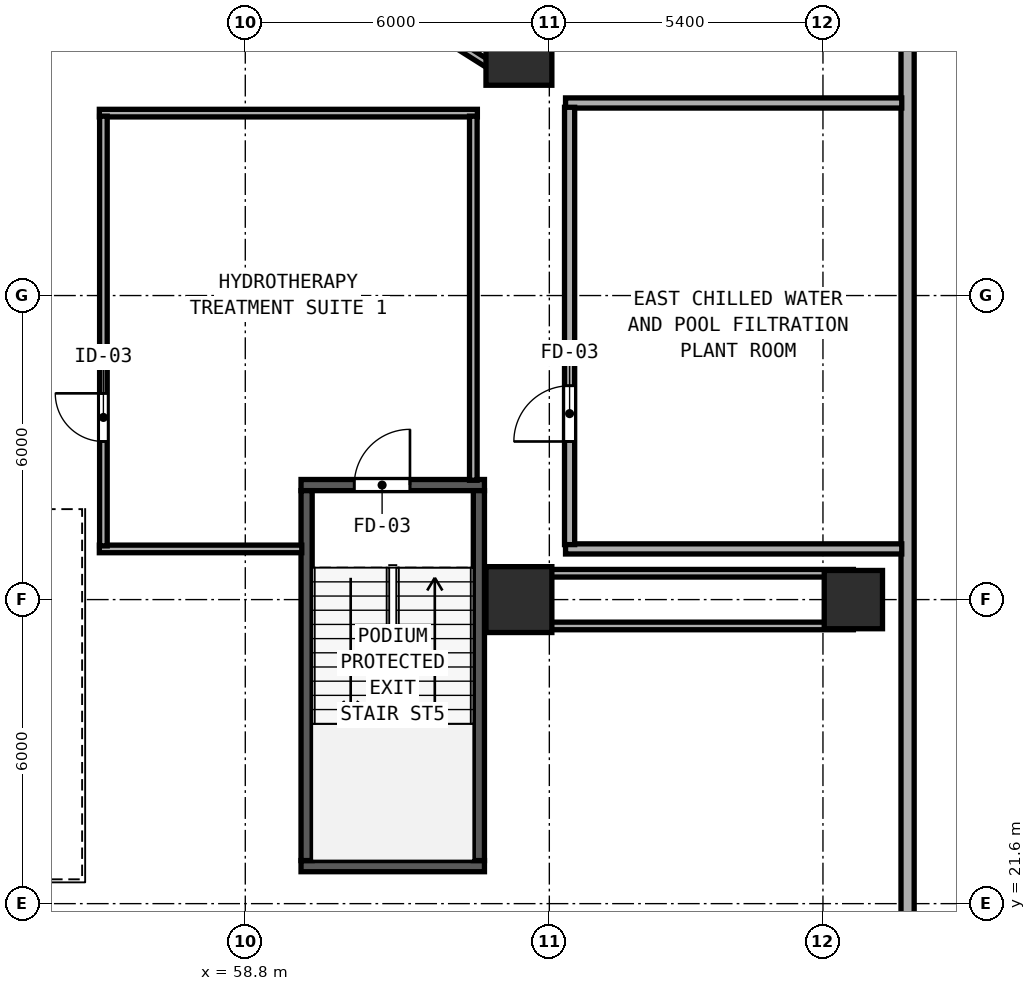
"""IFC4 building model, lengths in metres.
Left out: names, types, materials, properties, quantities, classifications, styles, units other than length and angle.
Written with IfcOpenShell. Run it as: python <this file> out.ifc"""

import sys

from ifc_helpers import new_model, si_unit, direction, frame, frame_2d, origin, origin_2d, place, context, subcontext, project, spatial, rectangle, hollow_rectangle, extrude, element, fill, save


model = new_model("IFC4")
c1 = context("Model", 3, precision=1e-05, world=origin(), true_north=direction((0.0, 1.0)))
c2 = subcontext(c1, "Body", "Model", "MODEL_VIEW")
j1 = project(units=[si_unit("LENGTHUNIT", "METRE"), si_unit("PLANEANGLEUNIT", "RADIAN")], contexts=[c1])
p1 = place(None, origin())
s1 = spatial("IfcSite", under=j1, at=p1, CompositionType="ELEMENT")
p2 = place(p1, origin())
s2 = spatial("IfcBuilding", under=s1, at=p2, CompositionType="ELEMENT")
p3 = place(p2, frame((0.0, 0.0, 19.8)))
s3 = spatial("IfcBuildingStorey", under=s2, at=p3, CompositionType="ELEMENT", Elevation=19.8)
p4 = place(p3, frame((59.9, 29.86, 0.0), z_axis=(0.0, 0.0, 1.0), x_axis=(1.0, 0.0, 0.0)))
e1 = element("IfcWall", 1, at=p4, inside=s3, PredefinedType="SHEAR", context=c2, shape_type="SweptSolid", body=[
    extrude(rectangle(XDim=3.62, YDim=0.22, at=frame_2d((1.81, 0.0))), origin(), (0.0, 0.0, 1.0), 4.0),
])
p5 = place(p4, frame((1.05, 0.0, 0.0)))
e2 = element("IfcOpeningElement", 2, at=p5, cuts=e1, PredefinedType="OPENING", context=c2, shape_type="SweptSolid", body=[
    extrude(rectangle(XDim=1.1, YDim=2.15, at=frame_2d((0.55, 1.075))), frame((0.0, 0.12, 0.0), z_axis=(0.0, -1.0, 0.0), x_axis=(1.0, 0.0, 0.0)), (0.0, 0.0, 1.0), 0.24),
])
p6 = place(p3, frame((59.9, 22.34, 0.0), z_axis=(0.0, 0.0, 1.0), x_axis=(1.0, 0.0, 0.0)))
e3 = element("IfcWall", 3, at=p6, inside=s3, PredefinedType="SHEAR", context=c2, shape_type="SweptSolid", body=[
    extrude(rectangle(XDim=3.62, YDim=0.22, at=frame_2d((1.81, 0.0))), origin(), (0.0, 0.0, 1.0), 4.0),
])
for number, where, z_axis, x_axis in (
    (4, (60.01, 22.45, 0.0), (0.0, 0.0, 1.0), (0.0, 1.0, 0.0)),
    (5, (63.41, 22.45, 0.0), (0.0, 0.0, 1.0), (0.0, 1.0, 0.0)),
):
    element("IfcWall", number, at=place(p3, frame(where, z_axis=z_axis, x_axis=x_axis)), inside=s3, PredefinedType="SHEAR", context=c2, shape_type="SweptSolid", body=[
        extrude(rectangle(XDim=7.3, YDim=0.22, at=frame_2d((3.65, 0.0))), origin(), (0.0, 0.0, 1.0), 4.0),
    ])
for number, where, z_axis, x_axis in (
    (6, (64.2, 27.6, 0.0), (0.0, 0.0, 1.0), (1.0, 0.0, 0.0)),
    (7, (64.2, 38.4, 0.0), (0.0, 0.0, 1.0), (1.0, 0.0, 0.0)),
):
    element("IfcColumn", number, at=place(p3, frame(where, z_axis=z_axis, x_axis=x_axis)), inside=s3, PredefinedType="COLUMN", context=c2, shape_type="SweptSolid", body=[
        extrude(hollow_rectangle(XDim=1.3, YDim=1.3, WallThickness=0.048, at=origin_2d()), origin(), (0.0, 0.0, 1.0), 4.2),
    ])
p7 = place(p3, frame((70.8, 27.6, 0.0), z_axis=(0.0, 0.0, 1.0), x_axis=(1.0, 0.0, 0.0)))
e8 = element("IfcColumn", 8, at=p7, inside=s3, PredefinedType="COLUMN", context=c2, shape_type="SweptSolid", body=[
    extrude(hollow_rectangle(XDim=1.15, YDim=1.15, WallThickness=0.042, at=origin_2d()), origin(), (0.0, 0.0, 1.0), 4.2),
])
p8 = place(p3, frame((71.87, 16.799, 0.0), z_axis=(0.0, 0.0, 1.0), x_axis=(0.0, 1.0, 0.0)))
e9 = element("IfcWall", 9, at=p8, inside=s3, PredefinedType="SOLIDWALL", context=c2, shape_type="SweptSolid", body=[
    extrude(rectangle(XDim=37.296, YDim=0.26, at=frame_2d((18.648, 0.0))), origin(), (0.0, 0.0, 1.0), 4.0),
])
p9 = place(p3, frame((53.38, 21.92, 0.0), z_axis=(0.0, 0.0, 1.0), x_axis=(0.921634222314, -0.388059738005, 0.0)))
e10 = element("IfcWall", 10, at=p9, inside=s3, PredefinedType="PARTITIONING", context=c2, shape_type="SweptSolid", body=[
    extrude(rectangle(XDim=11.959, YDim=0.15, at=frame_2d((5.979, 0.0))), origin(), (0.0, 0.0, 1.0), 4.0),
])
p10 = place(p3, frame((53.38, 44.619, 0.0), z_axis=(0.0, 0.0, 1.0), x_axis=(0.845487507253, -0.533995201364, 0.0)))
e11 = element("IfcWall", 11, at=p10, inside=s3, PredefinedType="PARTITIONING", context=c2, shape_type="SweptSolid", body=[
    extrude(rectangle(XDim=12.469, YDim=0.15, at=frame_2d((6.234, 0.0))), origin(), (0.0, 0.0, 1.0), 4.0),
])
for number, where, z_axis, x_axis in (
    (12, (64.2, 27.08, 0.0), (0.0, 0.0, 1.0), (1.0, 0.0, 0.0)),
    (13, (64.2, 28.12, 0.0), (0.0, 0.0, 1.0), (1.0, 0.0, 0.0)),
):
    element("IfcWall", number, at=place(p3, frame(where, z_axis=z_axis, x_axis=x_axis)), inside=s3, PredefinedType="PARTITIONING", context=c2, shape_type="SweptSolid", body=[
        extrude(rectangle(XDim=6.6, YDim=0.15, at=frame_2d((3.3, 0.0))), origin(), (0.0, 0.0, 1.0), 4.0),
    ])
p11 = place(p3, frame((55.92, 37.2, 0.0), z_axis=(0.0, 0.0, 1.0), x_axis=(1.0, 0.0, 0.0)))
e14 = element("IfcWall", 14, at=p11, inside=s3, PredefinedType="PARTITIONING", context=c2, shape_type="SweptSolid", body=[
    extrude(rectangle(XDim=7.46, YDim=0.15, at=frame_2d((3.73, 0.0))), origin(), (0.0, 0.0, 1.0), 4.0),
])
p12 = place(p3, frame((55.92, 28.6, 0.0), z_axis=(0.0, 0.0, 1.0), x_axis=(1.0, 0.0, 0.0)))
e15 = element("IfcWall", 15, at=p12, inside=s3, PredefinedType="PARTITIONING", context=c2, shape_type="SweptSolid", body=[
    extrude(rectangle(XDim=3.995, YDim=0.15, at=frame_2d((1.998, 0.0))), origin(), (0.0, 0.0, 1.0), 4.0),
])
p13 = place(p3, frame((56.0, 28.66, 0.0), z_axis=(0.0, 0.0, 1.0), x_axis=(0.0, 1.0, 0.0)))
e16 = element("IfcWall", 16, at=p13, inside=s3, PredefinedType="PARTITIONING", context=c2, shape_type="SweptSolid", body=[
    extrude(rectangle(XDim=8.48, YDim=0.15, at=frame_2d((4.24, 0.0))), origin(), (0.0, 0.0, 1.0), 4.0),
])
p14 = place(p13, frame((2.06, 0.0, 0.0)))
e17 = element("IfcOpeningElement", 17, at=p14, cuts=e16, PredefinedType="OPENING", context=c2, shape_type="SweptSolid", body=[
    extrude(rectangle(XDim=0.95, YDim=2.12, at=frame_2d((0.475, 1.06))), frame((0.0, 0.085, 0.0), z_axis=(0.0, -1.0, 0.0), x_axis=(1.0, 0.0, 0.0)), (0.0, 0.0, 1.0), 0.17),
])
p15 = place(p3, frame((63.3, 29.955, 0.0), z_axis=(0.0, 0.0, 1.0), x_axis=(0.0, 1.0, 0.0)))
e18 = element("IfcWall", 18, at=p15, inside=s3, PredefinedType="PARTITIONING", context=c2, shape_type="SweptSolid", body=[
    extrude(rectangle(XDim=7.185, YDim=0.15, at=frame_2d((3.592, 0.0))), origin(), (0.0, 0.0, 1.0), 4.0),
])
for number, where, z_axis, x_axis in (
    (19, (65.12, 37.4, 0.0), (0.0, 0.0, 1.0), (1.0, 0.0, 0.0)),
    (20, (65.12, 28.6, 0.0), (0.0, 0.0, 1.0), (1.0, 0.0, 0.0)),
):
    element("IfcWall", number, at=place(p3, frame(where, z_axis=z_axis, x_axis=x_axis)), inside=s3, PredefinedType="SOLIDWALL", context=c2, shape_type="SweptSolid", body=[
        extrude(rectangle(XDim=6.635, YDim=0.2, at=frame_2d((3.317, 0.0))), origin(), (0.0, 0.0, 1.0), 4.0),
    ])
p16 = place(p3, frame((65.2, 28.685, 0.0), z_axis=(0.0, 0.0, 1.0), x_axis=(0.0, 1.0, 0.0)))
e21 = element("IfcWall", 21, at=p16, inside=s3, PredefinedType="SOLIDWALL", context=c2, shape_type="SweptSolid", body=[
    extrude(rectangle(XDim=8.63, YDim=0.2, at=frame_2d((4.315, 0.0))), origin(), (0.0, 0.0, 1.0), 4.0),
])
p17 = place(p16, frame((2.035, 0.0, 0.0)))
e22 = element("IfcOpeningElement", 22, at=p17, cuts=e21, PredefinedType="OPENING", context=c2, shape_type="SweptSolid", body=[
    extrude(rectangle(XDim=1.1, YDim=2.15, at=frame_2d((0.55, 1.075))), frame((0.0, 0.11, 0.0), z_axis=(0.0, -1.0, 0.0), x_axis=(1.0, 0.0, 0.0)), (0.0, 0.0, 1.0), 0.22),
])
p18 = place(p5, origin())
e23 = element("IfcDoor", 23, at=p18, inside=s3, OperationType="SINGLE_SWING_RIGHT", PredefinedType="DOOR", context=c2, shape_type="SweptSolid", body=[
    extrude(rectangle(XDim=1.1, YDim=2.15, at=frame_2d((0.55, 1.075))), frame((0.0, 0.025, 0.0), z_axis=(0.0, -1.0, 0.0), x_axis=(1.0, 0.0, 0.0)), (0.0, 0.0, 1.0), 0.05),
])
fill(e2, e23)
p19 = place(p14, origin())
e24 = element("IfcDoor", 24, at=p19, inside=s3, OperationType="SINGLE_SWING_RIGHT", PredefinedType="DOOR", context=c2, shape_type="SweptSolid", body=[
    extrude(rectangle(XDim=0.95, YDim=2.12, at=frame_2d((0.475, 1.06))), frame((0.0, 0.025, 0.0), z_axis=(0.0, -1.0, 0.0), x_axis=(1.0, 0.0, 0.0)), (0.0, 0.0, 1.0), 0.05),
])
fill(e17, e24)
p20 = place(p17, origin())
e25 = element("IfcDoor", 25, at=p20, inside=s3, OperationType="SINGLE_SWING_LEFT", PredefinedType="DOOR", context=c2, shape_type="SweptSolid", body=[
    extrude(rectangle(XDim=1.1, YDim=2.15, at=frame_2d((0.55, 1.075))), frame((0.0, 0.025, 0.0), z_axis=(0.0, -1.0, 0.0), x_axis=(1.0, 0.0, 0.0)), (0.0, 0.0, 1.0), 0.05),
])
fill(e22, e25)
save(model, sys.argv[1])
